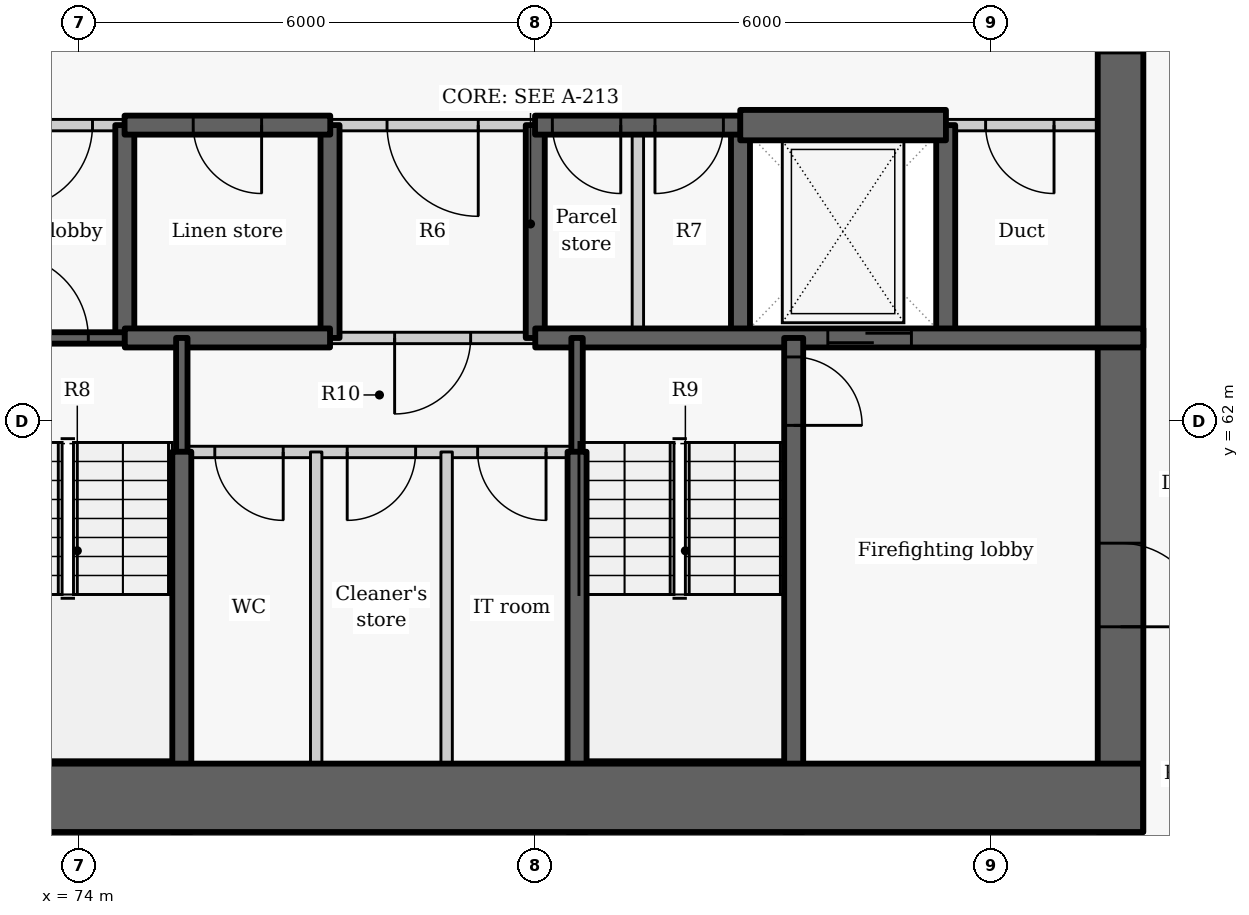
"""IFC4 building model, lengths in metres.
Left out: names, types, materials, properties, quantities, classifications, styles, units other than length and angle.
Written with IfcOpenShell. Run it as: python <this file> out.ifc"""

import sys

from ifc_helpers import new_model, si_unit, direction, frame, frame_2d, origin, place, context, subcontext, project, spatial, rectangle, extrude, element, fill, save


model = new_model("IFC4")
c1 = context("Model", 3, precision=1e-05, world=origin(), true_north=direction((0.0, 1.0)))
c2 = subcontext(c1, "Body", "Model", "MODEL_VIEW")
j1 = project(units=[si_unit("LENGTHUNIT", "METRE"), si_unit("PLANEANGLEUNIT", "RADIAN")], contexts=[c1])
p1 = place(None, origin())
s1 = spatial("IfcSite", under=j1, at=p1, CompositionType="ELEMENT")
p2 = place(p1, origin())
s2 = spatial("IfcBuilding", under=s1, at=p2, CompositionType="ELEMENT")
p3 = place(p2, frame((0.0, 0.0, 61.2)))
s3 = spatial("IfcBuildingStorey", under=s2, at=p3, CompositionType="ELEMENT", Elevation=61.2)
for number, where, z_axis, x_axis in (
    (1, (74.6, 63.1, -0.275), (0.0, 0.0, 1.0), (0.0, 1.0, 0.0)),
    (2, (77.3, 63.1, -0.275), (0.0, 0.0, 1.0), (0.0, 1.0, 0.0)),
    (3, (80.0, 63.1, -0.275), (0.0, 0.0, 1.0), (0.0, 1.0, 0.0)),
    (4, (82.7, 63.1, -0.275), (0.0, 0.0, 1.0), (0.0, 1.0, 0.0)),
    (5, (85.4, 63.1, -0.275), (0.0, 0.0, 1.0), (0.0, 1.0, 0.0)),
):
    element("IfcWall", number, at=place(p3, frame(where, z_axis=z_axis, x_axis=x_axis)), inside=s3, PredefinedType="SHEAR", context=c2, shape_type="SweptSolid", body=[
        extrude(rectangle(XDim=2.8, YDim=0.25, at=frame_2d((1.4, 0.0))), origin(), (0.0, 0.0, 1.0), 3.3),
    ])
p4 = place(p3, frame((87.7, 72.2, -0.275), z_axis=(0.0, 0.0, 1.0), x_axis=(0.0, -1.0, 0.0)))
e6 = element("IfcWall", 6, at=p4, inside=s3, PredefinedType="SHEAR", context=c2, shape_type="SweptSolid", body=[
    extrude(rectangle(XDim=15.6, YDim=0.6, at=frame_2d((7.8, 0.0))), origin(), (0.0, 0.0, 1.0), 3.3),
])
p5 = place(p4, frame((3.85, 0.0, 0.275)))
e7 = element("IfcOpeningElement", 7, at=p5, cuts=e6, PredefinedType="OPENING", context=c2, shape_type="SweptSolid", body=[
    extrude(rectangle(XDim=1.5, YDim=2.1, at=frame_2d((0.75, 1.05))), frame((0.0, 0.31, 0.0), z_axis=(0.0, -1.0, 0.0), x_axis=(1.0, 0.0, 0.0)), (0.0, 0.0, 1.0), 0.62),
])
p6 = place(p4, frame((11.8, 0.0, 0.275)))
e8 = element("IfcOpeningElement", 8, at=p6, cuts=e6, PredefinedType="OPENING", context=c2, shape_type="SweptSolid", body=[
    extrude(rectangle(XDim=1.1, YDim=2.1, at=frame_2d((0.55, 1.05))), frame((0.0, 0.31, 0.0), z_axis=(0.0, -1.0, 0.0), x_axis=(1.0, 0.0, 0.0)), (0.0, 0.0, 1.0), 0.62),
])
p7 = place(p3, frame((74.603, 65.9, 0.0), z_axis=(0.0, 0.0, 1.0), x_axis=(-1.0, 0.0, 0.0)))
e9 = element("IfcWall", 9, at=p7, inside=s3, PredefinedType="PARTITIONING", context=c2, shape_type="SweptSolid", body=[
    extrude(rectangle(XDim=2.603, YDim=0.15, at=frame_2d((1.302, 0.0))), origin(), (0.0, 0.0, 1.0), 3.025),
])
p8 = place(p7, frame((0.428, 0.0, 0.0)))
e10 = element("IfcOpeningElement", 10, at=p8, cuts=e9, PredefinedType="OPENING", context=c2, shape_type="SweptSolid", body=[
    extrude(rectangle(XDim=1.1, YDim=2.1, at=frame_2d((0.55, 1.05))), frame((0.0, 0.085, 0.0), z_axis=(0.0, -1.0, 0.0), x_axis=(1.0, 0.0, 0.0)), (0.0, 0.0, 1.0), 0.17),
])
p9 = place(p3, frame((80.003, 65.9, 0.0), z_axis=(0.0, 0.0, 1.0), x_axis=(-1.0, 0.0, 0.0)))
e11 = element("IfcWall", 11, at=p9, inside=s3, PredefinedType="PARTITIONING", context=c2, shape_type="SweptSolid", body=[
    extrude(rectangle(XDim=2.706, YDim=0.15, at=frame_2d((1.353, 0.0))), origin(), (0.0, 0.0, 1.0), 3.025),
])
p10 = place(p9, frame((0.753, 0.0, 0.0)))
e12 = element("IfcOpeningElement", 12, at=p10, cuts=e11, PredefinedType="OPENING", context=c2, shape_type="SweptSolid", body=[
    extrude(rectangle(XDim=1.2, YDim=2.1, at=frame_2d((0.6, 1.05))), frame((0.0, 0.085, 0.0), z_axis=(0.0, -1.0, 0.0), x_axis=(1.0, 0.0, 0.0)), (0.0, 0.0, 1.0), 0.17),
])
p11 = place(p3, frame((88.0, 65.9, 0.0), z_axis=(0.0, 0.0, 1.0), x_axis=(-1.0, 0.0, 0.0)))
e13 = element("IfcWall", 13, at=p11, inside=s3, PredefinedType="PARTITIONING", context=c2, shape_type="SweptSolid", body=[
    extrude(rectangle(XDim=2.603, YDim=0.15, at=frame_2d((1.302, 0.0))), origin(), (0.0, 0.0, 1.0), 3.025),
])
p12 = place(p11, frame((1.175, 0.0, 0.0)))
e14 = element("IfcOpeningElement", 14, at=p12, cuts=e13, PredefinedType="OPENING", context=c2, shape_type="SweptSolid", body=[
    extrude(rectangle(XDim=0.9, YDim=2.1, at=frame_2d((0.45, 1.05))), frame((0.0, 0.085, 0.0), z_axis=(0.0, -1.0, 0.0), x_axis=(1.0, 0.0, 0.0)), (0.0, 0.0, 1.0), 0.17),
])
p13 = place(p3, frame((77.303, 65.9, -0.275), z_axis=(0.0, 0.0, 1.0), x_axis=(-1.0, 0.0, 0.0)))
e15 = element("IfcWall", 15, at=p13, inside=s3, PredefinedType="SHEAR", context=c2, shape_type="SweptSolid", body=[
    extrude(rectangle(XDim=2.706, YDim=0.25, at=frame_2d((1.353, 0.0))), origin(), (0.0, 0.0, 1.0), 3.3),
])
p14 = place(p13, frame((0.903, 0.0, 0.275)))
e16 = element("IfcOpeningElement", 16, at=p14, cuts=e15, PredefinedType="OPENING", context=c2, shape_type="SweptSolid", body=[
    extrude(rectangle(XDim=0.9, YDim=2.1, at=frame_2d((0.45, 1.05))), frame((0.0, 0.135, 0.0), z_axis=(0.0, -1.0, 0.0), x_axis=(1.0, 0.0, 0.0)), (0.0, 0.0, 1.0), 0.27),
])
p15 = place(p3, frame((82.703, 65.9, -0.275), z_axis=(0.0, 0.0, 1.0), x_axis=(-1.0, 0.0, 0.0)))
e17 = element("IfcWall", 17, at=p15, inside=s3, PredefinedType="SHEAR", context=c2, shape_type="SweptSolid", body=[
    extrude(rectangle(XDim=2.706, YDim=0.25, at=frame_2d((1.353, 0.0))), origin(), (0.0, 0.0, 1.0), 3.3),
])
p16 = place(p15, frame((1.578, 0.0, 0.275)))
e18 = element("IfcOpeningElement", 18, at=p16, cuts=e17, PredefinedType="OPENING", context=c2, shape_type="SweptSolid", body=[
    extrude(rectangle(XDim=0.9, YDim=2.1, at=frame_2d((0.45, 1.05))), frame((0.0, 0.135, 0.0), z_axis=(0.0, -1.0, 0.0), x_axis=(1.0, 0.0, 0.0)), (0.0, 0.0, 1.0), 0.27),
])
p17 = place(p15, frame((0.228, 0.0, 0.275)))
e19 = element("IfcOpeningElement", 19, at=p17, cuts=e17, PredefinedType="OPENING", context=c2, shape_type="SweptSolid", body=[
    extrude(rectangle(XDim=0.9, YDim=2.1, at=frame_2d((0.45, 1.05))), frame((0.0, 0.135, 0.0), z_axis=(0.0, -1.0, 0.0), x_axis=(1.0, 0.0, 0.0)), (0.0, 0.0, 1.0), 0.27),
])
p18 = place(p3, frame((82.697, 65.9, -0.275), z_axis=(0.0, 0.0, 1.0), x_axis=(1.0, 0.0, 0.0)))
e20 = element("IfcWall", 20, at=p18, inside=s3, PredefinedType="SHEAR", context=c2, shape_type="SweptSolid", body=[
    extrude(rectangle(XDim=2.706, YDim=0.4, at=frame_2d((1.353, 0.0))), origin(), (0.0, 0.0, 1.0), 3.3),
])
p19 = place(p3, frame((72.0, 63.1, -0.275), z_axis=(0.0, 0.0, 1.0), x_axis=(1.0, 0.0, 0.0)))
e21 = element("IfcWall", 21, at=p19, inside=s3, PredefinedType="SHEAR", context=c2, shape_type="SweptSolid", body=[
    extrude(rectangle(XDim=2.6, YDim=0.15, at=frame_2d((1.3, 0.0))), origin(), (0.0, 0.0, 1.0), 3.3),
])
p20 = place(p19, frame((1.02, 0.0, 0.275)))
e22 = element("IfcOpeningElement", 22, at=p20, cuts=e21, PredefinedType="OPENING", context=c2, shape_type="SweptSolid", body=[
    extrude(rectangle(XDim=1.1, YDim=2.1, at=frame_2d((0.55, 1.05))), frame((0.0, 0.085, 0.0), z_axis=(0.0, -1.0, 0.0), x_axis=(1.0, 0.0, 0.0)), (0.0, 0.0, 1.0), 0.17),
])
p21 = place(p3, frame((74.6, 63.1, -0.275), z_axis=(0.0, 0.0, 1.0), x_axis=(1.0, 0.0, 0.0)))
e23 = element("IfcWall", 23, at=p21, inside=s3, PredefinedType="SHEAR", context=c2, shape_type="SweptSolid", body=[
    extrude(rectangle(XDim=2.7, YDim=0.25, at=frame_2d((1.35, 0.0))), origin(), (0.0, 0.0, 1.0), 3.3),
])
p22 = place(p3, frame((80.0, 63.1, -0.275), z_axis=(0.0, 0.0, 1.0), x_axis=(1.0, 0.0, 0.0)))
e24 = element("IfcWall", 24, at=p22, inside=s3, PredefinedType="SHEAR", context=c2, shape_type="SweptSolid", body=[
    extrude(rectangle(XDim=8.0, YDim=0.25, at=frame_2d((4.0, 0.0))), origin(), (0.0, 0.0, 1.0), 3.3),
])
p23 = place(p22, frame((3.849, 0.0, 0.275)))
e25 = element("IfcOpeningElement", 25, at=p23, cuts=e24, PredefinedType="OPENING", context=c2, shape_type="SweptSolid", body=[
    extrude(rectangle(XDim=1.1, YDim=2.1, at=frame_2d((0.55, 1.05))), frame((0.0, 0.135, 0.0), z_axis=(0.0, -1.0, 0.0), x_axis=(1.0, 0.0, 0.0)), (0.0, 0.0, 1.0), 0.27),
])
p24 = place(p3, frame((80.0, 63.1, 0.0), z_axis=(0.0, 0.0, 1.0), x_axis=(-1.0, 0.0, 0.0)))
e26 = element("IfcWall", 26, at=p24, inside=s3, PredefinedType="PARTITIONING", context=c2, shape_type="SweptSolid", body=[
    extrude(rectangle(XDim=2.7, YDim=0.15, at=frame_2d((1.35, 0.0))), origin(), (0.0, 0.0, 1.0), 3.025),
])
p25 = place(p24, frame((0.85, 0.0, 0.0)))
e27 = element("IfcOpeningElement", 27, at=p25, cuts=e26, PredefinedType="OPENING", context=c2, shape_type="SweptSolid", body=[
    extrude(rectangle(XDim=1.0, YDim=2.1, at=frame_2d((0.5, 1.05))), frame((0.0, 0.085, 0.0), z_axis=(0.0, -1.0, 0.0), x_axis=(1.0, 0.0, 0.0)), (0.0, 0.0, 1.0), 0.17),
])
p26 = place(p3, frame((81.35, 63.1, 0.0), z_axis=(0.0, 0.0, 1.0), x_axis=(0.0, 1.0, 0.0)))
e28 = element("IfcWall", 28, at=p26, inside=s3, PredefinedType="PARTITIONING", context=c2, shape_type="SweptSolid", body=[
    extrude(rectangle(XDim=2.8, YDim=0.15, at=frame_2d((1.4, 0.0))), origin(), (0.0, 0.0, 1.0), 3.025),
])
p27 = place(p3, frame((75.35, 61.597, -0.275), z_axis=(0.0, 0.0, 1.0), x_axis=(0.0, 1.0, 0.0)))
e29 = element("IfcWall", 29, at=p27, inside=s3, PredefinedType="SHEAR", context=c2, shape_type="SweptSolid", body=[
    extrude(rectangle(XDim=1.503, YDim=0.15, at=frame_2d((0.751, 0.0))), origin(), (0.0, 0.0, 1.0), 3.3),
])
p28 = place(p3, frame((75.35, 56.6, -0.275), z_axis=(0.0, 0.0, 1.0), x_axis=(0.0, 1.0, 0.0)))
e30 = element("IfcWall", 30, at=p28, inside=s3, PredefinedType="SHEAR", context=c2, shape_type="SweptSolid", body=[
    extrude(rectangle(XDim=5.003, YDim=0.25, at=frame_2d((2.501, 0.0))), origin(), (0.0, 0.0, 1.0), 3.3),
])
p29 = place(p3, frame((83.4, 63.1, -0.275), z_axis=(0.0, 0.0, 1.0), x_axis=(0.0, -1.0, 0.0)))
e31 = element("IfcWall", 31, at=p29, inside=s3, PredefinedType="SHEAR", context=c2, shape_type="SweptSolid", body=[
    extrude(rectangle(XDim=6.5, YDim=0.25, at=frame_2d((3.25, 0.0))), origin(), (0.0, 0.0, 1.0), 3.3),
])
p30 = place(p29, frame((0.25, 0.0, 0.275)))
e32 = element("IfcOpeningElement", 32, at=p30, cuts=e31, PredefinedType="OPENING", context=c2, shape_type="SweptSolid", body=[
    extrude(rectangle(XDim=0.9, YDim=2.1, at=frame_2d((0.45, 1.05))), frame((0.0, 0.135, 0.0), z_axis=(0.0, -1.0, 0.0), x_axis=(1.0, 0.0, 0.0)), (0.0, 0.0, 1.0), 0.27),
])
p31 = place(p3, frame((80.55, 61.597, -0.275), z_axis=(0.0, 0.0, 1.0), x_axis=(0.0, 1.0, 0.0)))
e33 = element("IfcWall", 33, at=p31, inside=s3, PredefinedType="SHEAR", context=c2, shape_type="SweptSolid", body=[
    extrude(rectangle(XDim=1.503, YDim=0.15, at=frame_2d((0.751, 0.0))), origin(), (0.0, 0.0, 1.0), 3.3),
])
p32 = place(p3, frame((80.55, 56.6, -0.275), z_axis=(0.0, 0.0, 1.0), x_axis=(0.0, 1.0, 0.0)))
e34 = element("IfcWall", 34, at=p32, inside=s3, PredefinedType="SHEAR", context=c2, shape_type="SweptSolid", body=[
    extrude(rectangle(XDim=5.003, YDim=0.25, at=frame_2d((2.501, 0.0))), origin(), (0.0, 0.0, 1.0), 3.3),
])
p33 = place(p3, frame((80.55, 61.6, 0.0), z_axis=(0.0, 0.0, 1.0), x_axis=(-1.0, 0.0, 0.0)))
e35 = element("IfcWall", 35, at=p33, inside=s3, PredefinedType="PARTITIONING", context=c2, shape_type="SweptSolid", body=[
    extrude(rectangle(XDim=5.2, YDim=0.15, at=frame_2d((2.6, 0.0))), origin(), (0.0, 0.0, 1.0), 3.025),
])
p34 = place(p33, frame((3.866, 0.0, 0.0)))
e36 = element("IfcOpeningElement", 36, at=p34, cuts=e35, PredefinedType="OPENING", context=c2, shape_type="SweptSolid", body=[
    extrude(rectangle(XDim=0.9, YDim=2.1, at=frame_2d((0.45, 1.05))), frame((0.0, 0.085, 0.0), z_axis=(0.0, -1.0, 0.0), x_axis=(1.0, 0.0, 0.0)), (0.0, 0.0, 1.0), 0.17),
])
p35 = place(p33, frame((2.124, 0.0, 0.0)))
e37 = element("IfcOpeningElement", 37, at=p35, cuts=e35, PredefinedType="OPENING", context=c2, shape_type="SweptSolid", body=[
    extrude(rectangle(XDim=0.9, YDim=2.1, at=frame_2d((0.45, 1.05))), frame((0.0, 0.085, 0.0), z_axis=(0.0, -1.0, 0.0), x_axis=(1.0, 0.0, 0.0)), (0.0, 0.0, 1.0), 0.17),
])
p36 = place(p33, frame((0.408, 0.0, 0.0)))
e38 = element("IfcOpeningElement", 38, at=p36, cuts=e35, PredefinedType="OPENING", context=c2, shape_type="SweptSolid", body=[
    extrude(rectangle(XDim=0.9, YDim=2.1, at=frame_2d((0.45, 1.05))), frame((0.0, 0.085, 0.0), z_axis=(0.0, -1.0, 0.0), x_axis=(1.0, 0.0, 0.0)), (0.0, 0.0, 1.0), 0.17),
])
for number, where, z_axis, x_axis in (
    (39, (77.118, 56.6, 0.0), (0.0, 0.0, 1.0), (0.0, 1.0, 0.0)),
    (40, (78.834, 56.6, 0.0), (0.0, 0.0, 1.0), (0.0, 1.0, 0.0)),
):
    element("IfcWall", number, at=place(p3, frame(where, z_axis=z_axis, x_axis=x_axis)), inside=s3, PredefinedType="PARTITIONING", context=c2, shape_type="SweptSolid", body=[
        extrude(rectangle(XDim=5.0, YDim=0.15, at=frame_2d((2.5, 0.0))), origin(), (0.0, 0.0, 1.0), 3.025),
    ])
p37 = place(p3, frame((72.004, 57.05, -0.275), z_axis=(0.0, 0.0, 1.0), x_axis=(1.0, 0.0, 0.0)))
e41 = element("IfcWall", 41, at=p37, inside=s3, PredefinedType="SHEAR", context=c2, shape_type="SweptSolid", body=[
    extrude(rectangle(XDim=15.992, YDim=0.9, at=frame_2d((7.996, 0.0))), origin(), (0.0, 0.0, 1.0), 3.3),
])
p38 = place(p8, origin())
e42 = element("IfcDoor", 42, at=p38, inside=s3, OperationType="SINGLE_SWING_RIGHT", PredefinedType="DOOR", context=c2, shape_type="SweptSolid", body=[
    extrude(rectangle(XDim=1.1, YDim=2.1, at=frame_2d((0.55, 1.05))), frame((0.0, 0.025, 0.0), z_axis=(0.0, -1.0, 0.0), x_axis=(1.0, 0.0, 0.0)), (0.0, 0.0, 1.0), 0.05),
])
fill(e10, e42)
p39 = place(p14, origin())
e43 = element("IfcDoor", 43, at=p39, inside=s3, OperationType="SINGLE_SWING_LEFT", PredefinedType="DOOR", context=c2, shape_type="SweptSolid", body=[
    extrude(rectangle(XDim=0.9, YDim=2.1, at=frame_2d((0.45, 1.05))), frame((0.0, 0.025, 0.0), z_axis=(0.0, -1.0, 0.0), x_axis=(1.0, 0.0, 0.0)), (0.0, 0.0, 1.0), 0.05),
])
fill(e16, e43)
p40 = place(p10, origin())
e44 = element("IfcDoor", 44, at=p40, inside=s3, OperationType="DOUBLE_DOOR_SINGLE_SWING", PredefinedType="DOOR", context=c2, shape_type="SweptSolid", body=[
    extrude(rectangle(XDim=1.2, YDim=2.1, at=frame_2d((0.6, 1.05))), frame((0.0, 0.025, 0.0), z_axis=(0.0, -1.0, 0.0), x_axis=(1.0, 0.0, 0.0)), (0.0, 0.0, 1.0), 0.05),
])
fill(e12, e44)
p41 = place(p16, origin())
e45 = element("IfcDoor", 45, at=p41, inside=s3, OperationType="SINGLE_SWING_LEFT", PredefinedType="DOOR", context=c2, shape_type="SweptSolid", body=[
    extrude(rectangle(XDim=0.9, YDim=2.1, at=frame_2d((0.45, 1.05))), frame((0.0, 0.025, 0.0), z_axis=(0.0, -1.0, 0.0), x_axis=(1.0, 0.0, 0.0)), (0.0, 0.0, 1.0), 0.05),
])
fill(e18, e45)
p42 = place(p17, origin())
e46 = element("IfcDoor", 46, at=p42, inside=s3, OperationType="SINGLE_SWING_RIGHT", PredefinedType="DOOR", context=c2, shape_type="SweptSolid", body=[
    extrude(rectangle(XDim=0.9, YDim=2.1, at=frame_2d((0.45, 1.05))), frame((0.0, 0.025, 0.0), z_axis=(0.0, -1.0, 0.0), x_axis=(1.0, 0.0, 0.0)), (0.0, 0.0, 1.0), 0.05),
])
fill(e19, e46)
p43 = place(p23, origin())
e47 = element("IfcDoor", 47, at=p43, inside=s3, OperationType="SLIDING_TO_LEFT", PredefinedType="DOOR", context=c2, shape_type="SweptSolid", body=[
    extrude(rectangle(XDim=1.1, YDim=2.1, at=frame_2d((0.55, 1.05))), frame((0.0, 0.025, 0.0), z_axis=(0.0, -1.0, 0.0), x_axis=(1.0, 0.0, 0.0)), (0.0, 0.0, 1.0), 0.05),
])
fill(e25, e47)
p44 = place(p12, origin())
e48 = element("IfcDoor", 48, at=p44, inside=s3, OperationType="SINGLE_SWING_LEFT", PredefinedType="DOOR", context=c2, shape_type="SweptSolid", body=[
    extrude(rectangle(XDim=0.9, YDim=2.1, at=frame_2d((0.45, 1.05))), frame((0.0, 0.025, 0.0), z_axis=(0.0, -1.0, 0.0), x_axis=(1.0, 0.0, 0.0)), (0.0, 0.0, 1.0), 0.05),
])
fill(e14, e48)
p45 = place(p25, origin())
e49 = element("IfcDoor", 49, at=p45, inside=s3, OperationType="SINGLE_SWING_RIGHT", PredefinedType="DOOR", context=c2, shape_type="SweptSolid", body=[
    extrude(rectangle(XDim=1.0, YDim=2.1, at=frame_2d((0.5, 1.05))), frame((0.0, 0.025, 0.0), z_axis=(0.0, -1.0, 0.0), x_axis=(1.0, 0.0, 0.0)), (0.0, 0.0, 1.0), 0.05),
])
fill(e27, e49)
p46 = place(p34, origin())
e50 = element("IfcDoor", 50, at=p46, inside=s3, OperationType="SINGLE_SWING_LEFT", PredefinedType="DOOR", context=c2, shape_type="SweptSolid", body=[
    extrude(rectangle(XDim=0.9, YDim=2.1, at=frame_2d((0.45, 1.05))), frame((0.0, 0.025, 0.0), z_axis=(0.0, -1.0, 0.0), x_axis=(1.0, 0.0, 0.0)), (0.0, 0.0, 1.0), 0.05),
])
fill(e36, e50)
p47 = place(p35, origin())
e51 = element("IfcDoor", 51, at=p47, inside=s3, OperationType="SINGLE_SWING_RIGHT", PredefinedType="DOOR", context=c2, shape_type="SweptSolid", body=[
    extrude(rectangle(XDim=0.9, YDim=2.1, at=frame_2d((0.45, 1.05))), frame((0.0, 0.025, 0.0), z_axis=(0.0, -1.0, 0.0), x_axis=(1.0, 0.0, 0.0)), (0.0, 0.0, 1.0), 0.05),
])
fill(e37, e51)
p48 = place(p36, origin())
e52 = element("IfcDoor", 52, at=p48, inside=s3, OperationType="SINGLE_SWING_LEFT", PredefinedType="DOOR", context=c2, shape_type="SweptSolid", body=[
    extrude(rectangle(XDim=0.9, YDim=2.1, at=frame_2d((0.45, 1.05))), frame((0.0, 0.025, 0.0), z_axis=(0.0, -1.0, 0.0), x_axis=(1.0, 0.0, 0.0)), (0.0, 0.0, 1.0), 0.05),
])
fill(e38, e52)
p49 = place(p20, origin())
e53 = element("IfcDoor", 53, at=p49, inside=s3, OperationType="SINGLE_SWING_LEFT", PredefinedType="DOOR", context=c2, shape_type="SweptSolid", body=[
    extrude(rectangle(XDim=1.1, YDim=2.1, at=frame_2d((0.55, 1.05))), frame((0.0, 0.025, 0.0), z_axis=(0.0, -1.0, 0.0), x_axis=(1.0, 0.0, 0.0)), (0.0, 0.0, 1.0), 0.05),
])
fill(e22, e53)
p50 = place(p30, origin())
e54 = element("IfcDoor", 54, at=p50, inside=s3, OperationType="SINGLE_SWING_RIGHT", PredefinedType="DOOR", context=c2, shape_type="SweptSolid", body=[
    extrude(rectangle(XDim=0.9, YDim=2.1, at=frame_2d((0.45, 1.05))), frame((0.0, 0.025, 0.0), z_axis=(0.0, -1.0, 0.0), x_axis=(1.0, 0.0, 0.0)), (0.0, 0.0, 1.0), 0.05),
])
fill(e32, e54)
p51 = place(p5, origin())
e55 = element("IfcDoor", 55, at=p51, inside=s3, OperationType="DOUBLE_DOOR_SINGLE_SWING", PredefinedType="DOOR", context=c2, shape_type="SweptSolid", body=[
    extrude(rectangle(XDim=1.5, YDim=2.1, at=frame_2d((0.75, 1.05))), frame((0.0, 0.025, 0.0), z_axis=(0.0, -1.0, 0.0), x_axis=(1.0, 0.0, 0.0)), (0.0, 0.0, 1.0), 0.05),
])
fill(e7, e55)
p52 = place(p6, origin())
e56 = element("IfcDoor", 56, at=p52, inside=s3, OperationType="SINGLE_SWING_RIGHT", PredefinedType="DOOR", context=c2, shape_type="SweptSolid", body=[
    extrude(rectangle(XDim=1.1, YDim=2.1, at=frame_2d((0.55, 1.05))), frame((0.0, 0.025, 0.0), z_axis=(0.0, -1.0, 0.0), x_axis=(1.0, 0.0, 0.0)), (0.0, 0.0, 1.0), 0.05),
])
fill(e8, e56)
save(model, sys.argv[1])
